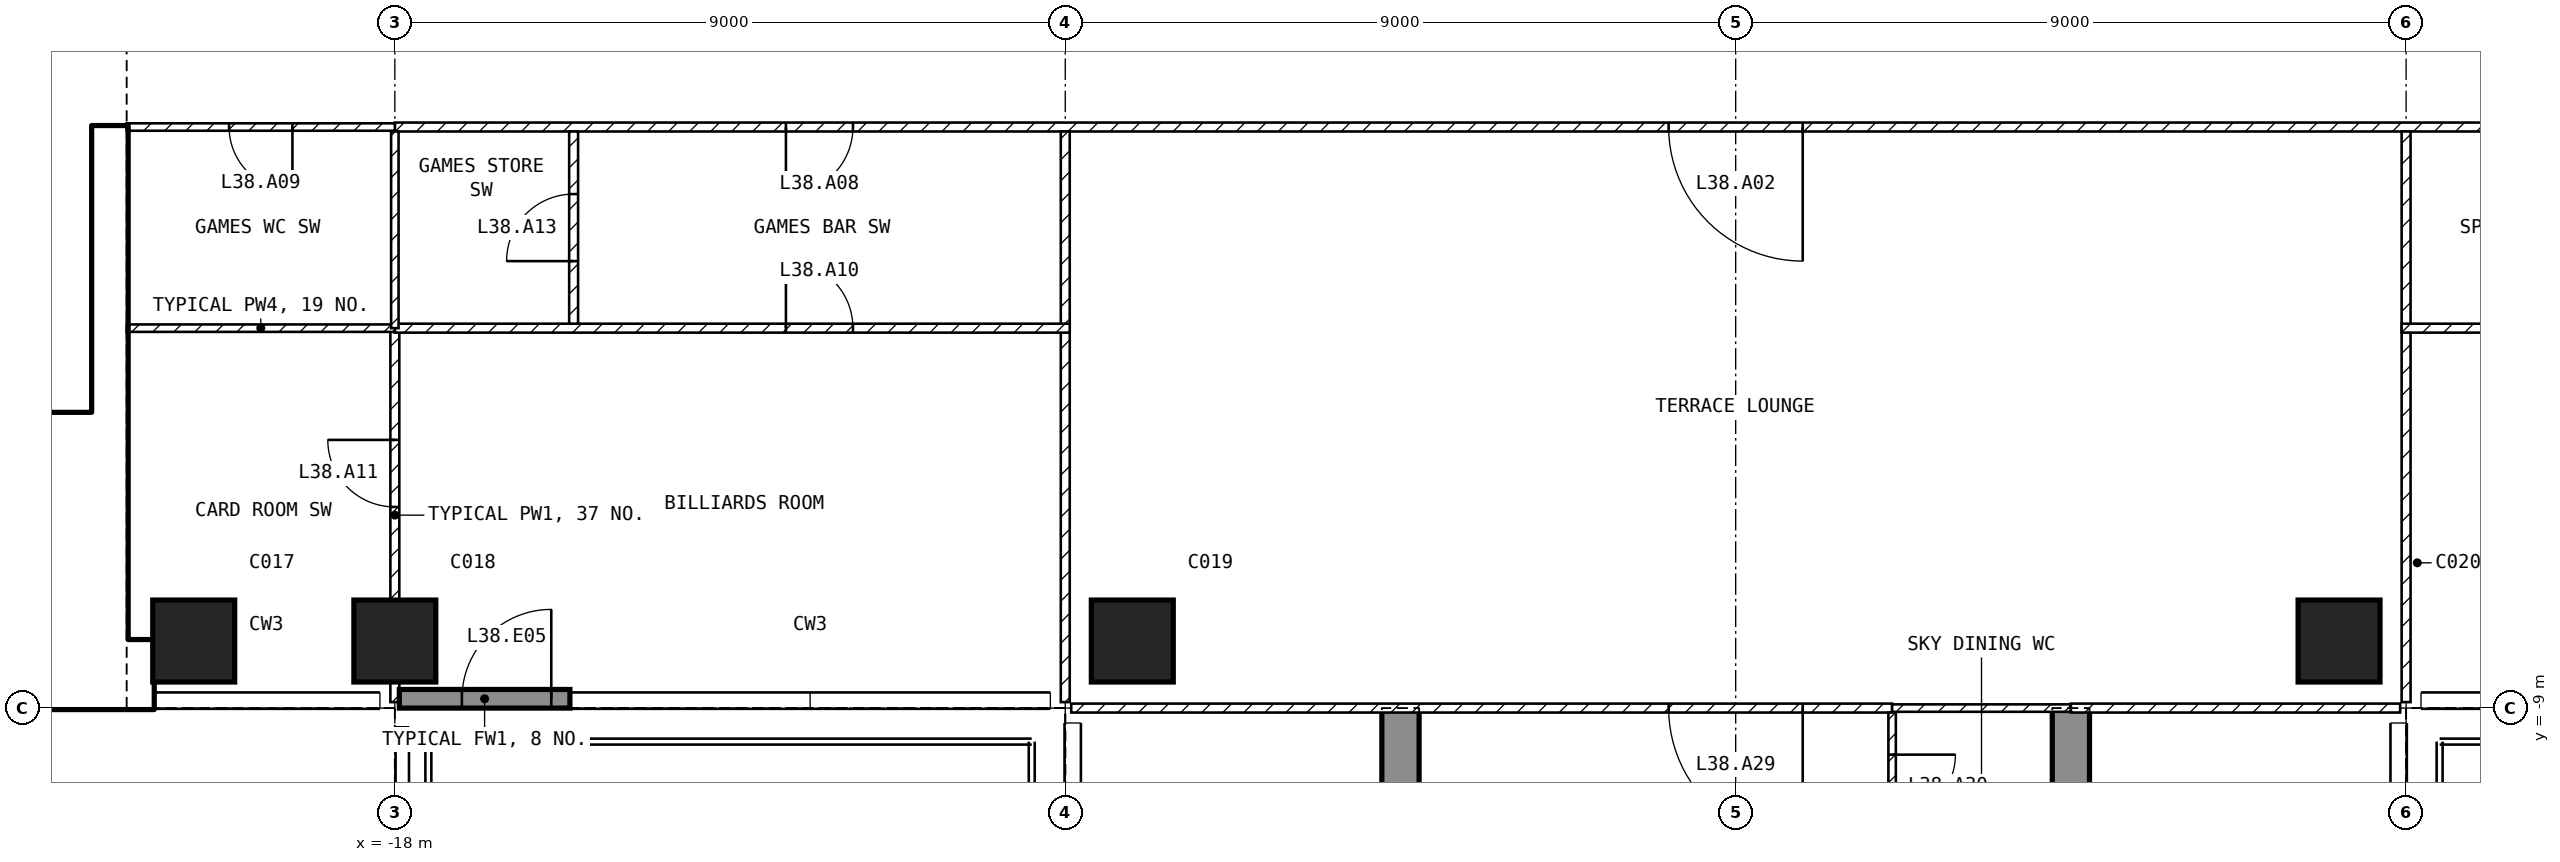
"""IFC4 building model, lengths in metres.
Left out: names, types, materials, properties, quantities, classifications, styles, units other than length and angle.
Written with IfcOpenShell. Run it as: python <this file> out.ifc"""

import sys

from ifc_helpers import new_model, si_unit, direction, frame, frame_2d, origin, origin_2d, place, context, subcontext, project, spatial, polyline, rectangle, outline, extrude, element, fill, save


model = new_model("IFC4")
c1 = context("Model", 3, precision=1e-05, world=origin(), true_north=direction((0.0, 1.0)))
c2 = subcontext(c1, "Body", "Model", "MODEL_VIEW")
j1 = project(units=[si_unit("LENGTHUNIT", "METRE"), si_unit("PLANEANGLEUNIT", "RADIAN")], contexts=[c1])
p1 = place(None, origin())
s1 = spatial("IfcSite", under=j1, at=p1, CompositionType="ELEMENT")
p2 = place(p1, origin())
s2 = spatial("IfcBuilding", under=s1, at=p2, CompositionType="ELEMENT")
p3 = place(p2, frame((0.0, 0.0, 154.9)))
s3 = spatial("IfcBuildingStorey", under=s2, at=p3, CompositionType="ELEMENT", Elevation=154.9)
for number, where, z_axis, x_axis in (
    (1, (-20.7, -8.1, -0.3), (0.0, 0.0, 1.0), (1.0, 0.0, 0.0)),
    (2, (-18.0, -8.1, -0.3), (0.0, 0.0, 1.0), (1.0, 0.0, 0.0)),
    (3, (-8.1, -8.1, -0.3), (0.0, 0.0, 1.0), (1.0, 0.0, 0.0)),
    (4, (8.1, -8.1, -0.3), (0.0, 0.0, 1.0), (1.0, 0.0, 0.0)),
):
    element("IfcColumn", number, at=place(p3, frame(where, z_axis=z_axis, x_axis=x_axis)), inside=s3, PredefinedType="COLUMN", context=c2, shape_type="SweptSolid", body=[
        extrude(rectangle(XDim=1.1, YDim=1.1, at=origin_2d()), origin(), (0.0, 0.0, 1.0), 7.05),
    ])
for number, where, z_axis, x_axis in (
    (5, (-4.75, -20.15, -0.3), (1.0, 0.0, 0.0), (0.0, 1.0, 0.0)),
    (6, (4.25, -20.15, -0.3), (1.0, 0.0, 0.0), (0.0, 1.0, 0.0)),
):
    element("IfcWall", number, at=place(p3, frame(where, z_axis=z_axis, x_axis=x_axis)), inside=s3, PredefinedType="SHEAR", context=c2, shape_type="SweptSolid", body=[
        extrude(outline(polyline([(0.0, 0.0), (6.65, 0.0), (6.65, 2.7), (9.05, 2.7), (9.05, 0.0), (11.15, 0.0), (11.15, 7.05), (0.0, 7.05), (0.0, 0.0)])), origin(), (0.0, 0.0, 1.0), 0.5),
    ])
p4 = place(p3, frame((-17.94, -8.875, 0.0), z_axis=(0.0, 0.0, 1.0), x_axis=(1.0, 0.0, 0.0)))
e7 = element("IfcWall", 7, at=p4, inside=s3, PredefinedType="SOLIDWALL", context=c2, shape_type="SweptSolid", body=[
    extrude(rectangle(XDim=2.29, YDim=0.25, at=frame_2d((1.145, 0.0))), origin(), (0.0, 0.0, 1.0), 6.75),
])
p5 = place(p4, frame((0.84, 0.0, 0.0)))
e8 = element("IfcOpeningElement", 8, at=p5, cuts=e7, PredefinedType="OPENING", context=c2, shape_type="SweptSolid", body=[
    extrude(rectangle(XDim=1.2, YDim=2.4, at=frame_2d((0.6, 1.2))), frame((0.0, 0.135, 0.0), z_axis=(0.0, -1.0, 0.0), x_axis=(1.0, 0.0, 0.0)), (0.0, 0.0, 1.0), 0.27),
])
p6 = place(p3, frame((-30.2, -8.55, 0.0), z_axis=(0.0, 0.0, 1.0), x_axis=(1.0, 0.0, 0.0)))
e9 = element("IfcWall", 9, at=p6, inside=s3, PredefinedType="SHEAR", context=c2, shape_type="SweptSolid", body=[
    extrude(rectangle(XDim=8.95, YDim=0.9, at=frame_2d((4.475, 0.0))), origin(), (0.0, 0.0, 1.0), 6.75),
])
p7 = place(p3, frame((-21.825, -8.1, 0.0), z_axis=(0.0, 0.0, 1.0), x_axis=(0.0, 1.0, 0.0)))
e10 = element("IfcWall", 10, at=p7, inside=s3, PredefinedType="SHEAR", context=c2, shape_type="SweptSolid", body=[
    extrude(rectangle(XDim=6.9, YDim=0.45, at=frame_2d((3.45, 0.0))), origin(), (0.0, 0.0, 1.0), 6.75),
])
p8 = place(p3, frame((-28.35, -5.15, 0.0), z_axis=(0.0, 0.0, 1.0), x_axis=(1.0, 0.0, 0.0)))
e11 = element("IfcWall", 11, at=p8, inside=s3, PredefinedType="SOLIDWALL", context=c2, shape_type="SweptSolid", body=[
    extrude(rectangle(XDim=6.3, YDim=0.2, at=frame_2d((3.15, 0.0))), origin(), (0.0, 0.0, 1.0), 6.75),
])
p9 = place(p8, frame((5.1, 0.0, 0.0)))
e12 = element("IfcOpeningElement", 12, at=p9, cuts=e11, PredefinedType="OPENING", context=c2, shape_type="SweptSolid", body=[
    extrude(rectangle(XDim=1.0, YDim=2.1, at=frame_2d((0.5, 1.05))), frame((0.0, 0.11, 0.0), z_axis=(0.0, -1.0, 0.0), x_axis=(1.0, 0.0, 0.0)), (0.0, 0.0, 1.0), 0.22),
])
p10 = place(p3, frame((18.3, -1.2, 0.0), z_axis=(0.0, 0.0, 1.0), x_axis=(-1.0, 0.0, 0.0)))
e13 = element("IfcWall", 13, at=p10, inside=s3, PredefinedType="PARTITIONING", context=c2, shape_type="SweptSolid", body=[
    extrude(rectangle(XDim=36.3, YDim=0.12, at=frame_2d((18.15, 0.0))), origin(), (0.0, 0.0, 1.0), 6.75),
])
p11 = place(p10, frame((17.4, 0.0, 0.0)))
e14 = element("IfcOpeningElement", 14, at=p11, cuts=e13, PredefinedType="OPENING", context=c2, shape_type="SweptSolid", body=[
    extrude(rectangle(XDim=1.8, YDim=2.1, at=frame_2d((0.9, 1.05))), frame((0.0, 0.07, 0.0), z_axis=(0.0, -1.0, 0.0), x_axis=(1.0, 0.0, 0.0)), (0.0, 0.0, 1.0), 0.14),
])
p12 = place(p10, frame((6.9, 0.0, 0.0)))
e15 = element("IfcOpeningElement", 15, at=p12, cuts=e13, PredefinedType="OPENING", context=c2, shape_type="SweptSolid", body=[
    extrude(rectangle(XDim=0.9, YDim=2.1, at=frame_2d((0.45, 1.05))), frame((0.0, 0.07, 0.0), z_axis=(0.0, -1.0, 0.0), x_axis=(1.0, 0.0, 0.0)), (0.0, 0.0, 1.0), 0.14),
])
p13 = place(p10, frame((30.15, 0.0, 0.0)))
e16 = element("IfcOpeningElement", 16, at=p13, cuts=e13, PredefinedType="OPENING", context=c2, shape_type="SweptSolid", body=[
    extrude(rectangle(XDim=0.9, YDim=2.1, at=frame_2d((0.45, 1.05))), frame((0.0, 0.07, 0.0), z_axis=(0.0, -1.0, 0.0), x_axis=(1.0, 0.0, 0.0)), (0.0, 0.0, 1.0), 0.14),
])
p14 = place(p3, frame((-18.0, -1.2, 0.0), z_axis=(0.0, 0.0, 1.0), x_axis=(-1.0, 0.0, 0.0)))
e17 = element("IfcWall", 17, at=p14, inside=s3, PredefinedType="PARTITIONING", context=c2, shape_type="SweptSolid", body=[
    extrude(rectangle(XDim=3.6, YDim=0.1, at=frame_2d((1.8, 0.0))), origin(), (0.0, 0.0, 1.0), 6.75),
])
p15 = place(p14, frame((1.375, 0.0, 0.0)))
e18 = element("IfcOpeningElement", 18, at=p15, cuts=e17, PredefinedType="OPENING", context=c2, shape_type="SweptSolid", body=[
    extrude(rectangle(XDim=0.85, YDim=2.1, at=frame_2d((0.425, 1.05))), frame((0.0, 0.06, 0.0), z_axis=(0.0, -1.0, 0.0), x_axis=(1.0, 0.0, 0.0)), (0.0, 0.0, 1.0), 0.12),
])
for number, where, z_axis, x_axis in (
    (19, (9.0, -1.26, 0.0), (0.0, 0.0, 1.0), (0.0, -1.0, 0.0)),
    (20, (-9.0, -8.92, 0.0), (0.0, 0.0, 1.0), (0.0, 1.0, 0.0)),
):
    element("IfcWall", number, at=place(p3, frame(where, z_axis=z_axis, x_axis=x_axis)), inside=s3, PredefinedType="PARTITIONING", context=c2, shape_type="SweptSolid", body=[
        extrude(rectangle(XDim=7.66, YDim=0.12, at=frame_2d((3.83, 0.0))), origin(), (0.0, 0.0, 1.0), 6.75),
    ])
p16 = place(p3, frame((2.1, -9.0, 0.0), z_axis=(0.0, 0.0, 1.0), x_axis=(-1.0, 0.0, 0.0)))
e21 = element("IfcWall", 21, at=p16, inside=s3, PredefinedType="PARTITIONING", context=c2, shape_type="SweptSolid", body=[
    extrude(rectangle(XDim=11.02, YDim=0.12, at=frame_2d((5.51, 0.0))), origin(), (0.0, 0.0, 1.0), 6.75),
])
p17 = place(p16, frame((1.2, 0.0, 0.0)))
e22 = element("IfcOpeningElement", 22, at=p17, cuts=e21, PredefinedType="OPENING", context=c2, shape_type="SweptSolid", body=[
    extrude(rectangle(XDim=1.8, YDim=2.1, at=frame_2d((0.9, 1.05))), frame((0.0, 0.07, 0.0), z_axis=(0.0, -1.0, 0.0), x_axis=(1.0, 0.0, 0.0)), (0.0, 0.0, 1.0), 0.14),
])
p18 = place(p3, frame((4.5, -9.0, 0.0), z_axis=(0.0, 0.0, 1.0), x_axis=(-1.0, 0.0, 0.0)))
e23 = element("IfcWall", 23, at=p18, inside=s3, PredefinedType="PARTITIONING", context=c2, shape_type="SweptSolid", body=[
    extrude(rectangle(XDim=2.4, YDim=0.1, at=frame_2d((1.2, 0.0))), origin(), (0.0, 0.0, 1.0), 6.75),
])
p19 = place(p3, frame((8.92, -9.0, 0.0), z_axis=(0.0, 0.0, 1.0), x_axis=(-1.0, 0.0, 0.0)))
e24 = element("IfcWall", 24, at=p19, inside=s3, PredefinedType="PARTITIONING", context=c2, shape_type="SweptSolid", body=[
    extrude(rectangle(XDim=4.42, YDim=0.12, at=frame_2d((2.21, 0.0))), origin(), (0.0, 0.0, 1.0), 6.75),
])
p20 = place(p3, frame((8.94, -3.9, 0.0), z_axis=(0.0, 0.0, 1.0), x_axis=(1.0, 0.0, 0.0)))
e25 = element("IfcWall", 25, at=p20, inside=s3, PredefinedType="PARTITIONING", context=c2, shape_type="SweptSolid", body=[
    extrude(rectangle(XDim=9.36, YDim=0.12, at=frame_2d((4.68, 0.0))), origin(), (0.0, 0.0, 1.0), 6.75),
])
p21 = place(p20, frame((1.56, 0.0, 0.0)))
e26 = element("IfcOpeningElement", 26, at=p21, cuts=e25, PredefinedType="OPENING", context=c2, shape_type="SweptSolid", body=[
    extrude(rectangle(XDim=0.9, YDim=2.1, at=frame_2d((0.45, 1.05))), frame((0.0, 0.07, 0.0), z_axis=(0.0, -1.0, 0.0), x_axis=(1.0, 0.0, 0.0)), (0.0, 0.0, 1.0), 0.14),
])
p22 = place(p3, frame((-18.0, -8.92, 0.0), z_axis=(0.0, 0.0, 1.0), x_axis=(0.0, 1.0, 0.0)))
e27 = element("IfcWall", 27, at=p22, inside=s3, PredefinedType="PARTITIONING", context=c2, shape_type="SweptSolid", body=[
    extrude(rectangle(XDim=5.02, YDim=0.12, at=frame_2d((2.51, 0.0))), origin(), (0.0, 0.0, 1.0), 5.914),
])
p23 = place(p22, frame((2.62, 0.0, 0.0)))
e28 = element("IfcOpeningElement", 28, at=p23, cuts=e27, PredefinedType="OPENING", context=c2, shape_type="SweptSolid", body=[
    extrude(rectangle(XDim=0.9, YDim=2.1, at=frame_2d((0.45, 1.05))), frame((0.0, 0.07, 0.0), z_axis=(0.0, -1.0, 0.0), x_axis=(1.0, 0.0, 0.0)), (0.0, 0.0, 1.0), 0.14),
])
p24 = place(p3, frame((-18.0, -3.9, 0.0), z_axis=(0.0, 0.0, 1.0), x_axis=(1.0, 0.0, 0.0)))
e29 = element("IfcWall", 29, at=p24, inside=s3, PredefinedType="PARTITIONING", context=c2, shape_type="SweptSolid", body=[
    extrude(rectangle(XDim=9.06, YDim=0.12, at=frame_2d((4.53, 0.0))), origin(), (0.0, 0.0, 1.0), 6.75),
])
p25 = place(p24, frame((5.25, 0.0, 0.0)))
e30 = element("IfcOpeningElement", 30, at=p25, cuts=e29, PredefinedType="OPENING", context=c2, shape_type="SweptSolid", body=[
    extrude(rectangle(XDim=0.9, YDim=2.1, at=frame_2d((0.45, 1.05))), frame((0.0, 0.07, 0.0), z_axis=(0.0, -1.0, 0.0), x_axis=(1.0, 0.0, 0.0)), (0.0, 0.0, 1.0), 0.14),
])
p26 = place(p3, frame((-21.6, -3.9, 0.0), z_axis=(0.0, 0.0, 1.0), x_axis=(1.0, 0.0, 0.0)))
e31 = element("IfcWall", 31, at=p26, inside=s3, PredefinedType="PARTITIONING", context=c2, shape_type="SweptSolid", body=[
    extrude(rectangle(XDim=3.6, YDim=0.1, at=frame_2d((1.8, 0.0))), origin(), (0.0, 0.0, 1.0), 6.75),
])
p27 = place(p3, frame((-15.6, -3.84, 0.0), z_axis=(0.0, 0.0, 1.0), x_axis=(0.0, 1.0, 0.0)))
e32 = element("IfcWall", 32, at=p27, inside=s3, PredefinedType="PARTITIONING", context=c2, shape_type="SweptSolid", body=[
    extrude(rectangle(XDim=2.58, YDim=0.12, at=frame_2d((1.29, 0.0))), origin(), (0.0, 0.0, 1.0), 6.75),
])
p28 = place(p27, frame((0.84, 0.0, 0.0)))
e33 = element("IfcOpeningElement", 33, at=p28, cuts=e32, PredefinedType="OPENING", context=c2, shape_type="SweptSolid", body=[
    extrude(rectangle(XDim=0.9, YDim=2.1, at=frame_2d((0.45, 1.05))), frame((0.0, 0.07, 0.0), z_axis=(0.0, -1.0, 0.0), x_axis=(1.0, 0.0, 0.0)), (0.0, 0.0, 1.0), 0.14),
])
p29 = place(p3, frame((-18.0, -3.9, 0.0), z_axis=(0.0, 0.0, 1.0), x_axis=(0.0, 1.0, 0.0)))
e34 = element("IfcWall", 34, at=p29, inside=s3, PredefinedType="PARTITIONING", context=c2, shape_type="SweptSolid", body=[
    extrude(rectangle(XDim=2.64, YDim=0.1, at=frame_2d((1.32, 0.0))), origin(), (0.0, 0.0, 1.0), 5.914),
])
p30 = place(p3, frame((2.1, -9.06, 0.0), z_axis=(0.0, 0.0, 1.0), x_axis=(0.0, -1.0, 0.0)))
e35 = element("IfcWall", 35, at=p30, inside=s3, PredefinedType="PARTITIONING", context=c2, shape_type="SweptSolid", body=[
    extrude(rectangle(XDim=1.98, YDim=0.1, at=frame_2d((0.99, 0.0))), origin(), (0.0, 0.0, 1.0), 6.75),
])
p31 = place(p30, frame((0.565, 0.0, 0.0)))
e36 = element("IfcOpeningElement", 36, at=p31, cuts=e35, PredefinedType="OPENING", context=c2, shape_type="SweptSolid", body=[
    extrude(rectangle(XDim=0.85, YDim=2.1, at=frame_2d((0.425, 1.05))), frame((0.0, 0.06, 0.0), z_axis=(0.0, -1.0, 0.0), x_axis=(1.0, 0.0, 0.0)), (0.0, 0.0, 1.0), 0.12),
])
p32 = place(p5, origin())
e37 = element("IfcDoor", 37, at=p32, inside=s3, OperationType="SINGLE_SWING_RIGHT", PredefinedType="DOOR", context=c2, shape_type="SweptSolid", body=[
    extrude(rectangle(XDim=1.2, YDim=2.4, at=frame_2d((0.6, 1.2))), frame((0.0, 0.025, 0.0), z_axis=(0.0, -1.0, 0.0), x_axis=(1.0, 0.0, 0.0)), (0.0, 0.0, 1.0), 0.05),
])
fill(e8, e37)
p33 = place(p9, origin())
e38 = element("IfcDoor", 38, at=p33, inside=s3, OperationType="SINGLE_SWING_LEFT", PredefinedType="DOOR", context=c2, shape_type="SweptSolid", body=[
    extrude(rectangle(XDim=1.0, YDim=2.1, at=frame_2d((0.5, 1.05))), frame((0.0, 0.025, 0.0), z_axis=(0.0, -1.0, 0.0), x_axis=(1.0, 0.0, 0.0)), (0.0, 0.0, 1.0), 0.05),
])
fill(e12, e38)
p34 = place(p11, origin())
e39 = element("IfcDoor", 39, at=p34, inside=s3, OperationType="SINGLE_SWING_LEFT", PredefinedType="DOOR", context=c2, shape_type="SweptSolid", body=[
    extrude(rectangle(XDim=1.8, YDim=2.1, at=frame_2d((0.9, 1.05))), frame((0.0, 0.025, 0.0), z_axis=(0.0, -1.0, 0.0), x_axis=(1.0, 0.0, 0.0)), (0.0, 0.0, 1.0), 0.05),
])
fill(e14, e39)
p35 = place(p13, origin())
e40 = element("IfcDoor", 40, at=p35, inside=s3, OperationType="SINGLE_SWING_RIGHT", PredefinedType="DOOR", context=c2, shape_type="SweptSolid", body=[
    extrude(rectangle(XDim=0.9, YDim=2.1, at=frame_2d((0.45, 1.05))), frame((0.0, 0.025, 0.0), z_axis=(0.0, -1.0, 0.0), x_axis=(1.0, 0.0, 0.0)), (0.0, 0.0, 1.0), 0.05),
])
fill(e16, e40)
p36 = place(p15, origin())
e41 = element("IfcDoor", 41, at=p36, inside=s3, OperationType="SINGLE_SWING_LEFT", PredefinedType="DOOR", context=c2, shape_type="SweptSolid", body=[
    extrude(rectangle(XDim=0.85, YDim=2.1, at=frame_2d((0.425, 1.05))), frame((0.0, 0.025, 0.0), z_axis=(0.0, -1.0, 0.0), x_axis=(1.0, 0.0, 0.0)), (0.0, 0.0, 1.0), 0.05),
])
fill(e18, e41)
p37 = place(p25, origin())
e42 = element("IfcDoor", 42, at=p37, inside=s3, OperationType="SINGLE_SWING_LEFT", PredefinedType="DOOR", context=c2, shape_type="SweptSolid", body=[
    extrude(rectangle(XDim=0.9, YDim=2.1, at=frame_2d((0.45, 1.05))), frame((0.0, 0.025, 0.0), z_axis=(0.0, -1.0, 0.0), x_axis=(1.0, 0.0, 0.0)), (0.0, 0.0, 1.0), 0.05),
])
fill(e30, e42)
p38 = place(p23, origin())
e43 = element("IfcDoor", 43, at=p38, inside=s3, OperationType="SINGLE_SWING_RIGHT", PredefinedType="DOOR", context=c2, shape_type="SweptSolid", body=[
    extrude(rectangle(XDim=0.9, YDim=2.1, at=frame_2d((0.45, 1.05))), frame((0.0, 0.025, 0.0), z_axis=(0.0, -1.0, 0.0), x_axis=(1.0, 0.0, 0.0)), (0.0, 0.0, 1.0), 0.05),
])
fill(e28, e43)
p39 = place(p28, origin())
e44 = element("IfcDoor", 44, at=p39, inside=s3, OperationType="SINGLE_SWING_LEFT", PredefinedType="DOOR", context=c2, shape_type="SweptSolid", body=[
    extrude(rectangle(XDim=0.9, YDim=2.1, at=frame_2d((0.45, 1.05))), frame((0.0, 0.025, 0.0), z_axis=(0.0, -1.0, 0.0), x_axis=(1.0, 0.0, 0.0)), (0.0, 0.0, 1.0), 0.05),
])
fill(e33, e44)
p40 = place(p17, origin())
e45 = element("IfcDoor", 45, at=p40, inside=s3, OperationType="SINGLE_SWING_LEFT", PredefinedType="DOOR", context=c2, shape_type="SweptSolid", body=[
    extrude(rectangle(XDim=1.8, YDim=2.1, at=frame_2d((0.9, 1.05))), frame((0.0, 0.025, 0.0), z_axis=(0.0, -1.0, 0.0), x_axis=(1.0, 0.0, 0.0)), (0.0, 0.0, 1.0), 0.05),
])
fill(e22, e45)
p41 = place(p31, origin())
e46 = element("IfcDoor", 46, at=p41, inside=s3, OperationType="SINGLE_SWING_LEFT", PredefinedType="DOOR", context=c2, shape_type="SweptSolid", body=[
    extrude(rectangle(XDim=0.85, YDim=2.1, at=frame_2d((0.425, 1.05))), frame((0.0, 0.025, 0.0), z_axis=(0.0, -1.0, 0.0), x_axis=(1.0, 0.0, 0.0)), (0.0, 0.0, 1.0), 0.05),
])
fill(e36, e46)
save(model, sys.argv[1])
